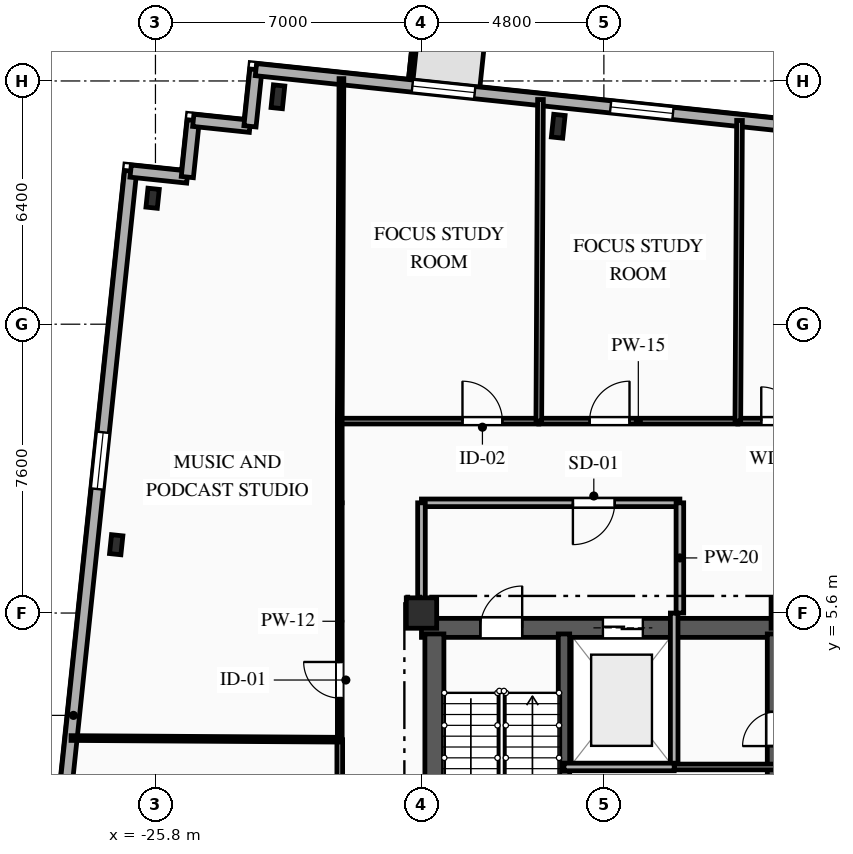
"""IFC4 building model, lengths in metres.
Left out: names, types, materials, properties, quantities, classifications, styles, units other than length and angle.
Written with IfcOpenShell. Run it as: python <this file> out.ifc"""

import sys

from ifc_helpers import new_model, si_unit, direction, frame, frame_2d, origin, origin_2d, place, context, subcontext, project, spatial, rectangle, i_section, extrude, element, fill, save


model = new_model("IFC4")
c1 = context("Model", 3, precision=1e-05, world=origin(), true_north=direction((0.0, 1.0)))
c2 = subcontext(c1, "Body", "Model", "MODEL_VIEW")
j1 = project(units=[si_unit("LENGTHUNIT", "METRE"), si_unit("PLANEANGLEUNIT", "RADIAN")], contexts=[c1])
p1 = place(None, origin())
s1 = spatial("IfcSite", under=j1, at=p1, CompositionType="ELEMENT")
p2 = place(p1, origin())
s2 = spatial("IfcBuilding", under=s1, at=p2, CompositionType="ELEMENT")
p3 = place(p2, frame((0.0, 0.0, 199.75)))
s3 = spatial("IfcBuildingStorey", under=s2, at=p3, CompositionType="ELEMENT", Elevation=199.75)
for number, where, z_axis, x_axis in (
    (1, (-18.8, 5.6, 0.0), (0.0, 0.0, 1.0), (1.0, 0.0, 0.0)),
    (2, (-9.2, 5.6, 0.0), (0.0, 0.0, 1.0), (1.0, 0.0, 0.0)),
):
    element("IfcColumn", number, at=place(p3, frame(where, z_axis=z_axis, x_axis=x_axis)), inside=s3, PredefinedType="COLUMN", context=c2, shape_type="SweptSolid", body=[
        extrude(rectangle(XDim=0.8, YDim=0.8, at=origin_2d()), origin(), (0.0, 0.0, 1.0), 3.35),
    ])
for number, where, z_axis, x_axis in (
    (3, (-15.201, 18.409, 0.0), (0.0, 0.0, 1.0), (0.995, -0.105, 0.0)),
    (4, (-22.577, 19.184, 0.0), (0.0, 0.0, 1.0), (0.995, -0.105, 0.0)),
):
    element("IfcColumn", number, at=place(p3, frame(where, z_axis=z_axis, x_axis=x_axis)), inside=s3, PredefinedType="COLUMN", context=c2, shape_type="SweptSolid", body=[
        extrude(i_section(OverallWidth=0.3, OverallDepth=0.6, WebThickness=0.015, FlangeThickness=0.03, FilletRadius=0.027, at=origin_2d()), origin(), (0.0, 0.0, 1.0), 3.35),
    ])
for number, where, z_axis, x_axis in (
    (5, (-25.875, 16.514, 0.0), (0.0, 0.0, 1.0), (0.995, -0.105, 0.0)),
    (6, (-26.833, 7.398, 0.0), (0.0, 0.0, 1.0), (0.995, -0.105, 0.0)),
):
    element("IfcColumn", number, at=place(p3, frame(where, z_axis=z_axis, x_axis=x_axis)), inside=s3, PredefinedType="COLUMN", context=c2, shape_type="SweptSolid", body=[
        extrude(i_section(OverallWidth=0.3, OverallDepth=0.5, WebThickness=0.014, FlangeThickness=0.028, FilletRadius=0.027, at=origin_2d()), origin(), (0.0, 0.0, 1.0), 3.35),
    ])
p4 = place(p3, frame((-29.463, -11.414, 0.0), z_axis=(0.0, 0.0, 1.0), x_axis=(0.104530779244, 0.994521651947, 0.0)))
e7 = element("IfcWall", 7, at=p4, inside=s3, PredefinedType="SOLIDWALL", context=c2, shape_type="SweptSolid", body=[
    extrude(rectangle(XDim=28.8, YDim=0.32, at=frame_2d((14.4, 0.0))), origin(), (0.0, 0.0, 1.0), 3.04),
])
p5 = place(p4, frame((6.355, 0.0, 0.85)))
e8 = element("IfcOpeningElement", 8, at=p5, cuts=e7, PredefinedType="OPENING", context=c2, shape_type="SweptSolid", body=[
    extrude(rectangle(XDim=1.65, YDim=1.85, at=frame_2d((0.825, 0.925))), frame((0.0, 0.17, 0.0), z_axis=(0.0, -1.0, 0.0), x_axis=(1.0, 0.0, 0.0)), (0.0, 0.0, 1.0), 0.34),
])
p6 = place(p4, frame((20.389, 0.0, 0.85)))
e9 = element("IfcOpeningElement", 9, at=p6, cuts=e7, PredefinedType="OPENING", context=c2, shape_type="SweptSolid", body=[
    extrude(rectangle(XDim=1.5, YDim=1.85, at=frame_2d((0.75, 0.925))), frame((0.0, 0.17, 0.0), z_axis=(0.0, -1.0, 0.0), x_axis=(1.0, 0.0, 0.0)), (0.0, 0.0, 1.0), 0.34),
])
p7 = place(p3, frame((-26.453, 17.229, 0.0), z_axis=(0.0, 0.0, 1.0), x_axis=(0.994508128223, -0.104659366031, 0.0)))
e10 = element("IfcWall", 10, at=p7, inside=s3, PredefinedType="SOLIDWALL", context=c2, shape_type="SweptSolid", body=[
    extrude(rectangle(XDim=1.5, YDim=0.32, at=frame_2d((0.75, 0.0))), origin(), (0.0, 0.0, 1.0), 3.04),
])
p8 = place(p3, frame((-24.961, 17.072, 0.0), z_axis=(0.0, 0.0, 1.0), x_axis=(0.104642427191, 0.994509910675, 0.0)))
e11 = element("IfcWall", 11, at=p8, inside=s3, PredefinedType="SOLIDWALL", context=c2, shape_type="SweptSolid", body=[
    extrude(rectangle(XDim=1.5, YDim=0.32, at=frame_2d((0.75, 0.0))), origin(), (0.0, 0.0, 1.0), 3.04),
])
p9 = place(p3, frame((-24.804, 18.563, 0.0), z_axis=(0.0, 0.0, 1.0), x_axis=(0.994508128223, -0.104659366031, 0.0)))
e12 = element("IfcWall", 12, at=p9, inside=s3, PredefinedType="SOLIDWALL", context=c2, shape_type="SweptSolid", body=[
    extrude(rectangle(XDim=1.5, YDim=0.32, at=frame_2d((0.75, 0.0))), origin(), (0.0, 0.0, 1.0), 3.04),
])
p10 = place(p3, frame((-23.312, 18.406, 0.0), z_axis=(0.0, 0.0, 1.0), x_axis=(0.104481464157, 0.994526834051, 0.0)))
e13 = element("IfcWall", 13, at=p10, inside=s3, PredefinedType="SOLIDWALL", context=c2, shape_type="SweptSolid", body=[
    extrude(rectangle(XDim=1.5, YDim=0.32, at=frame_2d((0.75, 0.0))), origin(), (0.0, 0.0, 1.0), 3.04),
])
p11 = place(p3, frame((-23.156, 19.898, 0.0), z_axis=(0.0, 0.0, 1.0), x_axis=(0.994522001802, -0.104527450613, 0.0)))
e14 = element("IfcWall", 14, at=p11, inside=s3, PredefinedType="SOLIDWALL", context=c2, shape_type="SweptSolid", body=[
    extrude(rectangle(XDim=45.8, YDim=0.32, at=frame_2d((22.9, 0.0))), origin(), (0.0, 0.0, 1.0), 3.04),
])
p12 = place(p11, frame((4.139, 0.0, 0.85)))
e15 = element("IfcOpeningElement", 15, at=p12, cuts=e14, PredefinedType="OPENING", context=c2, shape_type="SweptSolid", body=[
    extrude(rectangle(XDim=1.65, YDim=1.85, at=frame_2d((0.825, 0.925))), frame((0.0, 0.17, 0.0), z_axis=(0.0, -1.0, 0.0), x_axis=(1.0, 0.0, 0.0)), (0.0, 0.0, 1.0), 0.34),
])
p13 = place(p11, frame((9.384, 0.0, 0.85)))
e16 = element("IfcOpeningElement", 16, at=p13, cuts=e14, PredefinedType="OPENING", context=c2, shape_type="SweptSolid", body=[
    extrude(rectangle(XDim=1.65, YDim=1.85, at=frame_2d((0.825, 0.925))), frame((0.0, 0.17, 0.0), z_axis=(0.0, -1.0, 0.0), x_axis=(1.0, 0.0, 0.0)), (0.0, 0.0, 1.0), 0.34),
])
p14 = place(p11, frame((18.547, 0.0, 0.85)))
e17 = element("IfcOpeningElement", 17, at=p14, cuts=e14, PredefinedType="OPENING", context=c2, shape_type="SweptSolid", body=[
    extrude(rectangle(XDim=1.5, YDim=1.85, at=frame_2d((0.75, 0.925))), frame((0.0, 0.17, 0.0), z_axis=(0.0, -1.0, 0.0), x_axis=(1.0, 0.0, 0.0)), (0.0, 0.0, 1.0), 0.34),
])
p15 = place(p11, frame((27.525, 0.0, 0.85)))
e18 = element("IfcOpeningElement", 18, at=p15, cuts=e14, PredefinedType="OPENING", context=c2, shape_type="SweptSolid", body=[
    extrude(rectangle(XDim=2.2, YDim=1.85, at=frame_2d((1.1, 0.925))), frame((0.0, 0.17, 0.0), z_axis=(0.0, -1.0, 0.0), x_axis=(1.0, 0.0, 0.0)), (0.0, 0.0, 1.0), 0.34),
])
p16 = place(p11, frame((38.329, 0.0, 0.85)))
e19 = element("IfcOpeningElement", 19, at=p16, cuts=e14, PredefinedType="OPENING", context=c2, shape_type="SweptSolid", body=[
    extrude(rectangle(XDim=1.65, YDim=1.85, at=frame_2d((0.825, 0.925))), frame((0.0, 0.17, 0.0), z_axis=(0.0, -1.0, 0.0), x_axis=(1.0, 0.0, 0.0)), (0.0, 0.0, 1.0), 0.34),
])
p17 = place(p3, frame((-18.8, 5.21, 0.0), z_axis=(0.0, 0.0, 1.0), x_axis=(1.0, 0.0, 0.0)))
e20 = element("IfcWall", 20, at=p17, inside=s3, PredefinedType="SHEAR", context=c2, shape_type="SweptSolid", body=[
    extrude(rectangle(XDim=9.6, YDim=0.5, at=frame_2d((4.8, 0.0))), origin(), (0.0, 0.0, 1.0), 3.04),
])
p18 = place(p17, frame((1.55, 0.0, 0.0)))
e21 = element("IfcOpeningElement", 21, at=p18, cuts=e20, PredefinedType="OPENING", context=c2, shape_type="SweptSolid", body=[
    extrude(rectangle(XDim=1.1, YDim=2.15, at=frame_2d((0.55, 1.075))), frame((0.0, 0.26, 0.0), z_axis=(0.0, -1.0, 0.0), x_axis=(1.0, 0.0, 0.0)), (0.0, 0.0, 1.0), 0.52),
])
p19 = place(p17, frame((4.775, 0.0, 0.0)))
e22 = element("IfcOpeningElement", 22, at=p19, cuts=e20, PredefinedType="OPENING", context=c2, shape_type="SweptSolid", body=[
    extrude(rectangle(XDim=1.05, YDim=2.1, at=frame_2d((0.525, 1.05))), frame((0.0, 0.26, 0.0), z_axis=(0.0, -1.0, 0.0), x_axis=(1.0, 0.0, 0.0)), (0.0, 0.0, 1.0), 0.52),
])
p20 = place(p3, frame((-18.46, -5.05, 0.0), z_axis=(0.0, 0.0, 1.0), x_axis=(0.0, 1.0, 0.0)))
e23 = element("IfcWall", 23, at=p20, inside=s3, PredefinedType="SHEAR", context=c2, shape_type="SweptSolid", body=[
    extrude(rectangle(XDim=10.1, YDim=0.5, at=frame_2d((5.05, 0.0))), origin(), (0.0, 0.0, 1.0), 3.04),
])
p21 = place(p3, frame((-9.45, -5.05, 0.0), z_axis=(0.0, 0.0, 1.0), x_axis=(0.0, 1.0, 0.0)))
e24 = element("IfcWall", 24, at=p21, inside=s3, PredefinedType="SHEAR", context=c2, shape_type="SweptSolid", body=[
    extrude(rectangle(XDim=10.1, YDim=0.5, at=frame_2d((5.05, 0.0))), origin(), (0.0, 0.0, 1.0), 3.04),
])
p22 = place(p21, frame((7.15, 0.0, 0.0)))
e25 = element("IfcOpeningElement", 25, at=p22, cuts=e24, PredefinedType="OPENING", context=c2, shape_type="SweptSolid", body=[
    extrude(rectangle(XDim=0.9, YDim=2.1, at=frame_2d((0.45, 1.05))), frame((0.0, 0.26, 0.0), z_axis=(0.0, -1.0, 0.0), x_axis=(1.0, 0.0, 0.0)), (0.0, 0.0, 1.0), 0.52),
])
p23 = place(p21, frame((2.4, 0.0, 0.0)))
e26 = element("IfcOpeningElement", 26, at=p23, cuts=e24, PredefinedType="OPENING", context=c2, shape_type="SweptSolid", body=[
    extrude(rectangle(XDim=1.2, YDim=2.15, at=frame_2d((0.6, 1.075))), frame((0.0, 0.26, 0.0), z_axis=(0.0, -1.0, 0.0), x_axis=(1.0, 0.0, 0.0)), (0.0, 0.0, 1.0), 0.52),
])
p24 = place(p21, frame((0.35, 0.0, 0.0)))
e27 = element("IfcOpeningElement", 27, at=p24, cuts=e24, PredefinedType="OPENING", context=c2, shape_type="SweptSolid", body=[
    extrude(rectangle(XDim=0.9, YDim=2.1, at=frame_2d((0.45, 1.05))), frame((0.0, 0.26, 0.0), z_axis=(0.0, -1.0, 0.0), x_axis=(1.0, 0.0, 0.0)), (0.0, 0.0, 1.0), 0.52),
])
p25 = place(p21, frame((5.0, 0.0, 0.0)))
e28 = element("IfcOpeningElement", 28, at=p25, cuts=e24, PredefinedType="OPENING", context=c2, shape_type="SweptSolid", body=[
    extrude(rectangle(XDim=0.9, YDim=2.1, at=frame_2d((0.45, 1.05))), frame((0.0, 0.26, 0.0), z_axis=(0.0, -1.0, 0.0), x_axis=(1.0, 0.0, 0.0)), (0.0, 0.0, 1.0), 0.52),
])
p26 = place(p3, frame((-15.05, -5.05, 0.0), z_axis=(0.0, 0.0, 1.0), x_axis=(0.0, 1.0, 0.0)))
e29 = element("IfcWall", 29, at=p26, inside=s3, PredefinedType="SHEAR", context=c2, shape_type="SweptSolid", body=[
    extrude(rectangle(XDim=10.1, YDim=0.3, at=frame_2d((5.05, 0.0))), origin(), (0.0, 0.0, 1.0), 3.04),
])
p27 = place(p3, frame((-12.15, 1.55, 0.0), z_axis=(0.0, 0.0, 1.0), x_axis=(0.0, 1.0, 0.0)))
e30 = element("IfcWall", 30, at=p27, inside=s3, PredefinedType="PARTITIONING", context=c2, shape_type="SweptSolid", body=[
    extrude(rectangle(XDim=4.05, YDim=0.2, at=frame_2d((2.025, 0.0))), origin(), (0.0, 0.0, 1.0), 3.04),
])
p28 = place(p3, frame((-12.0, 8.5, 0.0), z_axis=(0.0, 0.0, 1.0), x_axis=(-1.0, 0.0, 0.0)))
e31 = element("IfcWall", 31, at=p28, inside=s3, PredefinedType="PARTITIONING", context=c2, shape_type="SweptSolid", body=[
    extrude(rectangle(XDim=6.8, YDim=0.2, at=frame_2d((3.4, 0.0))), origin(), (0.0, 0.0, 1.0), 3.04),
])
p29 = place(p28, frame((1.715, 0.0, 0.0)))
e32 = element("IfcOpeningElement", 32, at=p29, cuts=e31, PredefinedType="OPENING", context=c2, shape_type="SweptSolid", body=[
    extrude(rectangle(XDim=1.1, YDim=2.15, at=frame_2d((0.55, 1.075))), frame((0.0, 0.11, 0.0), z_axis=(0.0, -1.0, 0.0), x_axis=(1.0, 0.0, 0.0)), (0.0, 0.0, 1.0), 0.22),
])
p30 = place(p3, frame((-18.8, 8.5, 0.0), z_axis=(0.0, 0.0, 1.0), x_axis=(0.0, -1.0, 0.0)))
e33 = element("IfcWall", 33, at=p30, inside=s3, PredefinedType="PARTITIONING", context=c2, shape_type="SweptSolid", body=[
    extrude(rectangle(XDim=2.9, YDim=0.2, at=frame_2d((1.45, 0.0))), origin(), (0.0, 0.0, 1.0), 2.665),
])
p31 = place(p3, frame((-12.0, 5.6, 0.0), z_axis=(0.0, 0.0, 1.0), x_axis=(0.0, 1.0, 0.0)))
e34 = element("IfcWall", 34, at=p31, inside=s3, PredefinedType="PARTITIONING", context=c2, shape_type="SweptSolid", body=[
    extrude(rectangle(XDim=2.9, YDim=0.2, at=frame_2d((1.45, 0.0))), origin(), (0.0, 0.0, 1.0), 3.04),
])
p32 = place(p3, frame((-12.15, 1.55, 0.0), z_axis=(0.0, 0.0, 1.0), x_axis=(1.0, 0.0, 0.0)))
e35 = element("IfcWall", 35, at=p32, inside=s3, PredefinedType="PARTITIONING", context=c2, shape_type="SweptSolid", body=[
    extrude(rectangle(XDim=2.95, YDim=0.15, at=frame_2d((1.475, 0.0))), origin(), (0.0, 0.0, 1.0), 3.04),
])
p33 = place(p3, frame((-20.95, 8.5, 0.0), z_axis=(0.0, 0.0, 1.0), x_axis=(0.0, 1.0, 0.0)))
e36 = element("IfcWall", 36, at=p33, inside=s3, PredefinedType="PARTITIONING", context=c2, shape_type="SweptSolid", body=[
    extrude(rectangle(XDim=2.15, YDim=0.125, at=frame_2d((1.075, 0.0))), origin(), (0.0, 0.0, 1.0), 3.04),
])
p34 = place(p3, frame((-20.95, 10.65, 0.0), z_axis=(0.0, 0.0, 1.0), x_axis=(1.0, 0.0, 0.0)))
e37 = element("IfcWall", 37, at=p34, inside=s3, PredefinedType="PARTITIONING", context=c2, shape_type="SweptSolid", body=[
    extrude(rectangle(XDim=5.238, YDim=0.15, at=frame_2d((2.619, 0.0))), origin(), (0.0, 0.0, 1.0), 3.04),
])
p35 = place(p34, frame((3.229, 0.0, 0.0)))
e38 = element("IfcOpeningElement", 38, at=p35, cuts=e37, PredefinedType="OPENING", context=c2, shape_type="SweptSolid", body=[
    extrude(rectangle(XDim=1.05, YDim=2.15, at=frame_2d((0.525, 1.075))), frame((0.0, 0.085, 0.0), z_axis=(0.0, -1.0, 0.0), x_axis=(1.0, 0.0, 0.0)), (0.0, 0.0, 1.0), 0.17),
])
p36 = place(p3, frame((-15.712, 10.65, 0.0), z_axis=(0.0, 0.0, 1.0), x_axis=(1.0, 0.0, 0.0)))
e39 = element("IfcWall", 39, at=p36, inside=s3, PredefinedType="PARTITIONING", context=c2, shape_type="SweptSolid", body=[
    extrude(rectangle(XDim=5.237, YDim=0.15, at=frame_2d((2.619, 0.0))), origin(), (0.0, 0.0, 1.0), 3.04),
])
p37 = place(p36, frame((1.337, 0.0, 0.0)))
e40 = element("IfcOpeningElement", 40, at=p37, cuts=e39, PredefinedType="OPENING", context=c2, shape_type="SweptSolid", body=[
    extrude(rectangle(XDim=1.05, YDim=2.15, at=frame_2d((0.525, 1.075))), frame((0.0, 0.085, 0.0), z_axis=(0.0, -1.0, 0.0), x_axis=(1.0, 0.0, 0.0)), (0.0, 0.0, 1.0), 0.17),
])
p38 = place(p3, frame((-10.475, 10.65, 0.0), z_axis=(0.0, 0.0, 1.0), x_axis=(1.0, 0.0, 0.0)))
e41 = element("IfcWall", 41, at=p38, inside=s3, PredefinedType="PLUMBINGWALL", context=c2, shape_type="SweptSolid", body=[
    extrude(rectangle(XDim=2.35, YDim=0.15, at=frame_2d((1.175, 0.0))), origin(), (0.0, 0.0, 1.0), 3.04),
])
p39 = place(p38, frame((0.616, 0.0, 0.0)))
e42 = element("IfcOpeningElement", 42, at=p39, cuts=e41, PredefinedType="OPENING", context=c2, shape_type="SweptSolid", body=[
    extrude(rectangle(XDim=0.9, YDim=2.1, at=frame_2d((0.45, 1.05))), frame((0.0, 0.085, 0.0), z_axis=(0.0, -1.0, 0.0), x_axis=(1.0, 0.0, 0.0)), (0.0, 0.0, 1.0), 0.17),
])
p40 = place(p3, frame((-20.95, -5.6, 0.0), z_axis=(0.0, 0.0, 1.0), x_axis=(0.0, 1.0, 0.0)))
e43 = element("IfcWall", 43, at=p40, inside=s3, PredefinedType="PARTITIONING", context=c2, shape_type="SweptSolid", body=[
    extrude(rectangle(XDim=7.867, YDim=0.15, at=frame_2d((3.934, 0.0))), origin(), (0.0, 0.0, 1.0), 3.04),
])
p41 = place(p40, frame((4.823, 0.0, 0.0)))
e44 = element("IfcOpeningElement", 44, at=p41, cuts=e43, PredefinedType="OPENING", context=c2, shape_type="SweptSolid", body=[
    extrude(rectangle(XDim=1.05, YDim=2.15, at=frame_2d((0.525, 1.075))), frame((0.0, 0.085, 0.0), z_axis=(0.0, -1.0, 0.0), x_axis=(1.0, 0.0, 0.0)), (0.0, 0.0, 1.0), 0.17),
])
p42 = place(p3, frame((-20.95, 2.267, 0.0), z_axis=(0.0, 0.0, 1.0), x_axis=(0.0, 1.0, 0.0)))
e45 = element("IfcWall", 45, at=p42, inside=s3, PredefinedType="PARTITIONING", context=c2, shape_type="SweptSolid", body=[
    extrude(rectangle(XDim=6.233, YDim=0.125, at=frame_2d((3.116, 0.0))), origin(), (0.0, 0.0, 1.0), 3.04),
])
p43 = place(p42, frame((1.095, 0.0, 0.0)))
e46 = element("IfcOpeningElement", 46, at=p43, cuts=e45, PredefinedType="OPENING", context=c2, shape_type="SweptSolid", body=[
    extrude(rectangle(XDim=0.95, YDim=2.1, at=frame_2d((0.475, 1.05))), frame((0.0, 0.073, 0.0), z_axis=(0.0, -1.0, 0.0), x_axis=(1.0, 0.0, 0.0)), (0.0, 0.0, 1.0), 0.145),
])
p44 = place(p3, frame((-28.021, 2.311, 0.0), z_axis=(0.0, 0.0, 1.0), x_axis=(0.99998090118, -0.006180394355, 0.0)))
e47 = element("IfcWall", 47, at=p44, inside=s3, PredefinedType="PARTITIONING", context=c2, shape_type="SweptSolid", body=[
    extrude(rectangle(XDim=7.071, YDim=0.125, at=frame_2d((3.536, 0.0))), origin(), (0.0, 0.0, 1.0), 3.04),
])
p45 = place(p3, frame((-20.906, 19.662, 0.0), z_axis=(0.0, 0.0, 1.0), x_axis=(-0.004876272857, -0.999988110911, 0.0)))
e48 = element("IfcWall", 48, at=p45, inside=s3, PredefinedType="PARTITIONING", context=c2, shape_type="SweptSolid", body=[
    extrude(rectangle(XDim=9.012, YDim=0.125, at=frame_2d((4.506, 0.0))), origin(), (0.0, 0.0, 1.0), 2.665),
])
p46 = place(p3, frame((-15.669, 19.112, 0.0), z_axis=(0.0, 0.0, 1.0), x_axis=(-0.005164534834, -0.999986663701, 0.0)))
e49 = element("IfcWall", 49, at=p46, inside=s3, PredefinedType="PARTITIONING", context=c2, shape_type="SweptSolid", body=[
    extrude(rectangle(XDim=8.462, YDim=0.15, at=frame_2d((4.231, 0.0))), origin(), (0.0, 0.0, 1.0), 2.665),
])
p47 = place(p3, frame((-10.431, 18.561, 0.0), z_axis=(0.0, 0.0, 1.0), x_axis=(-0.005554784069, -0.999984572068, 0.0)))
e50 = element("IfcWall", 50, at=p47, inside=s3, PredefinedType="PLUMBINGWALL", context=c2, shape_type="SweptSolid", body=[
    extrude(rectangle(XDim=7.911, YDim=0.15, at=frame_2d((3.956, 0.0))), origin(), (0.0, 0.0, 1.0), 3.04),
])
p48 = place(p3, frame((-15.05, 1.55, 0.0), z_axis=(0.0, 0.0, 1.0), x_axis=(1.0, 0.0, 0.0)))
e51 = element("IfcWall", 51, at=p48, inside=s3, PredefinedType="PARTITIONING", context=c2, shape_type="SweptSolid", body=[
    extrude(rectangle(XDim=2.9, YDim=0.2, at=frame_2d((1.45, 0.0))), origin(), (0.0, 0.0, 1.0), 3.04),
])
p49 = place(p6, origin())
e52 = element("IfcWindow", 52, at=p49, inside=s3, PartitioningType="SINGLE_PANEL", PredefinedType="WINDOW", context=c2, shape_type="SweptSolid", body=[
    extrude(rectangle(XDim=1.5, YDim=1.85, at=frame_2d((0.75, 0.925))), frame((0.0, 0.03, 0.0), z_axis=(0.0, -1.0, 0.0), x_axis=(1.0, 0.0, 0.0)), (0.0, 0.0, 1.0), 0.06),
])
fill(e9, e52)
p50 = place(p12, origin())
e53 = element("IfcWindow", 53, at=p50, inside=s3, PartitioningType="SINGLE_PANEL", PredefinedType="WINDOW", context=c2, shape_type="SweptSolid", body=[
    extrude(rectangle(XDim=1.65, YDim=1.85, at=frame_2d((0.825, 0.925))), frame((0.0, 0.03, 0.0), z_axis=(0.0, -1.0, 0.0), x_axis=(1.0, 0.0, 0.0)), (0.0, 0.0, 1.0), 0.06),
])
fill(e15, e53)
p51 = place(p13, origin())
e54 = element("IfcWindow", 54, at=p51, inside=s3, PartitioningType="SINGLE_PANEL", PredefinedType="WINDOW", context=c2, shape_type="SweptSolid", body=[
    extrude(rectangle(XDim=1.65, YDim=1.85, at=frame_2d((0.825, 0.925))), frame((0.0, 0.03, 0.0), z_axis=(0.0, -1.0, 0.0), x_axis=(1.0, 0.0, 0.0)), (0.0, 0.0, 1.0), 0.06),
])
fill(e16, e54)
p52 = place(p18, origin())
e55 = element("IfcDoor", 55, at=p52, inside=s3, OperationType="SINGLE_SWING_RIGHT", PredefinedType="DOOR", context=c2, shape_type="SweptSolid", body=[
    extrude(rectangle(XDim=1.1, YDim=2.15, at=frame_2d((0.55, 1.075))), frame((0.0, 0.025, 0.0), z_axis=(0.0, -1.0, 0.0), x_axis=(1.0, 0.0, 0.0)), (0.0, 0.0, 1.0), 0.05),
])
fill(e21, e55)
p53 = place(p19, origin())
e56 = element("IfcDoor", 56, at=p53, inside=s3, OperationType="DOUBLE_DOOR_SLIDING", PredefinedType="DOOR", context=c2, shape_type="SweptSolid", body=[
    extrude(rectangle(XDim=1.05, YDim=2.1, at=frame_2d((0.525, 1.05))), frame((0.0, 0.025, 0.0), z_axis=(0.0, -1.0, 0.0), x_axis=(1.0, 0.0, 0.0)), (0.0, 0.0, 1.0), 0.05),
])
fill(e22, e56)
p54 = place(p29, origin())
e57 = element("IfcDoor", 57, at=p54, inside=s3, OperationType="SINGLE_SWING_RIGHT", PredefinedType="DOOR", context=c2, shape_type="SweptSolid", body=[
    extrude(rectangle(XDim=1.1, YDim=2.15, at=frame_2d((0.55, 1.075))), frame((0.0, 0.025, 0.0), z_axis=(0.0, -1.0, 0.0), x_axis=(1.0, 0.0, 0.0)), (0.0, 0.0, 1.0), 0.05),
])
fill(e32, e57)
p55 = place(p35, origin())
e58 = element("IfcDoor", 58, at=p55, inside=s3, OperationType="SINGLE_SWING_LEFT", PredefinedType="DOOR", context=c2, shape_type="SweptSolid", body=[
    extrude(rectangle(XDim=1.05, YDim=2.15, at=frame_2d((0.525, 1.075))), frame((0.0, 0.025, 0.0), z_axis=(0.0, -1.0, 0.0), x_axis=(1.0, 0.0, 0.0)), (0.0, 0.0, 1.0), 0.05),
])
fill(e38, e58)
p56 = place(p37, origin())
e59 = element("IfcDoor", 59, at=p56, inside=s3, OperationType="SINGLE_SWING_RIGHT", PredefinedType="DOOR", context=c2, shape_type="SweptSolid", body=[
    extrude(rectangle(XDim=1.05, YDim=2.15, at=frame_2d((0.525, 1.075))), frame((0.0, 0.025, 0.0), z_axis=(0.0, -1.0, 0.0), x_axis=(1.0, 0.0, 0.0)), (0.0, 0.0, 1.0), 0.05),
])
fill(e40, e59)
p57 = place(p39, origin())
e60 = element("IfcDoor", 60, at=p57, inside=s3, OperationType="SINGLE_SWING_LEFT", PredefinedType="DOOR", context=c2, shape_type="SweptSolid", body=[
    extrude(rectangle(XDim=0.9, YDim=2.1, at=frame_2d((0.45, 1.05))), frame((0.0, 0.025, 0.0), z_axis=(0.0, -1.0, 0.0), x_axis=(1.0, 0.0, 0.0)), (0.0, 0.0, 1.0), 0.05),
])
fill(e42, e60)
p58 = place(p43, origin())
e61 = element("IfcDoor", 61, at=p58, inside=s3, OperationType="SINGLE_SWING_RIGHT", PredefinedType="DOOR", context=c2, shape_type="SweptSolid", body=[
    extrude(rectangle(XDim=0.95, YDim=2.1, at=frame_2d((0.475, 1.05))), frame((0.0, 0.025, 0.0), z_axis=(0.0, -1.0, 0.0), x_axis=(1.0, 0.0, 0.0)), (0.0, 0.0, 1.0), 0.05),
])
fill(e46, e61)
save(model, sys.argv[1])
